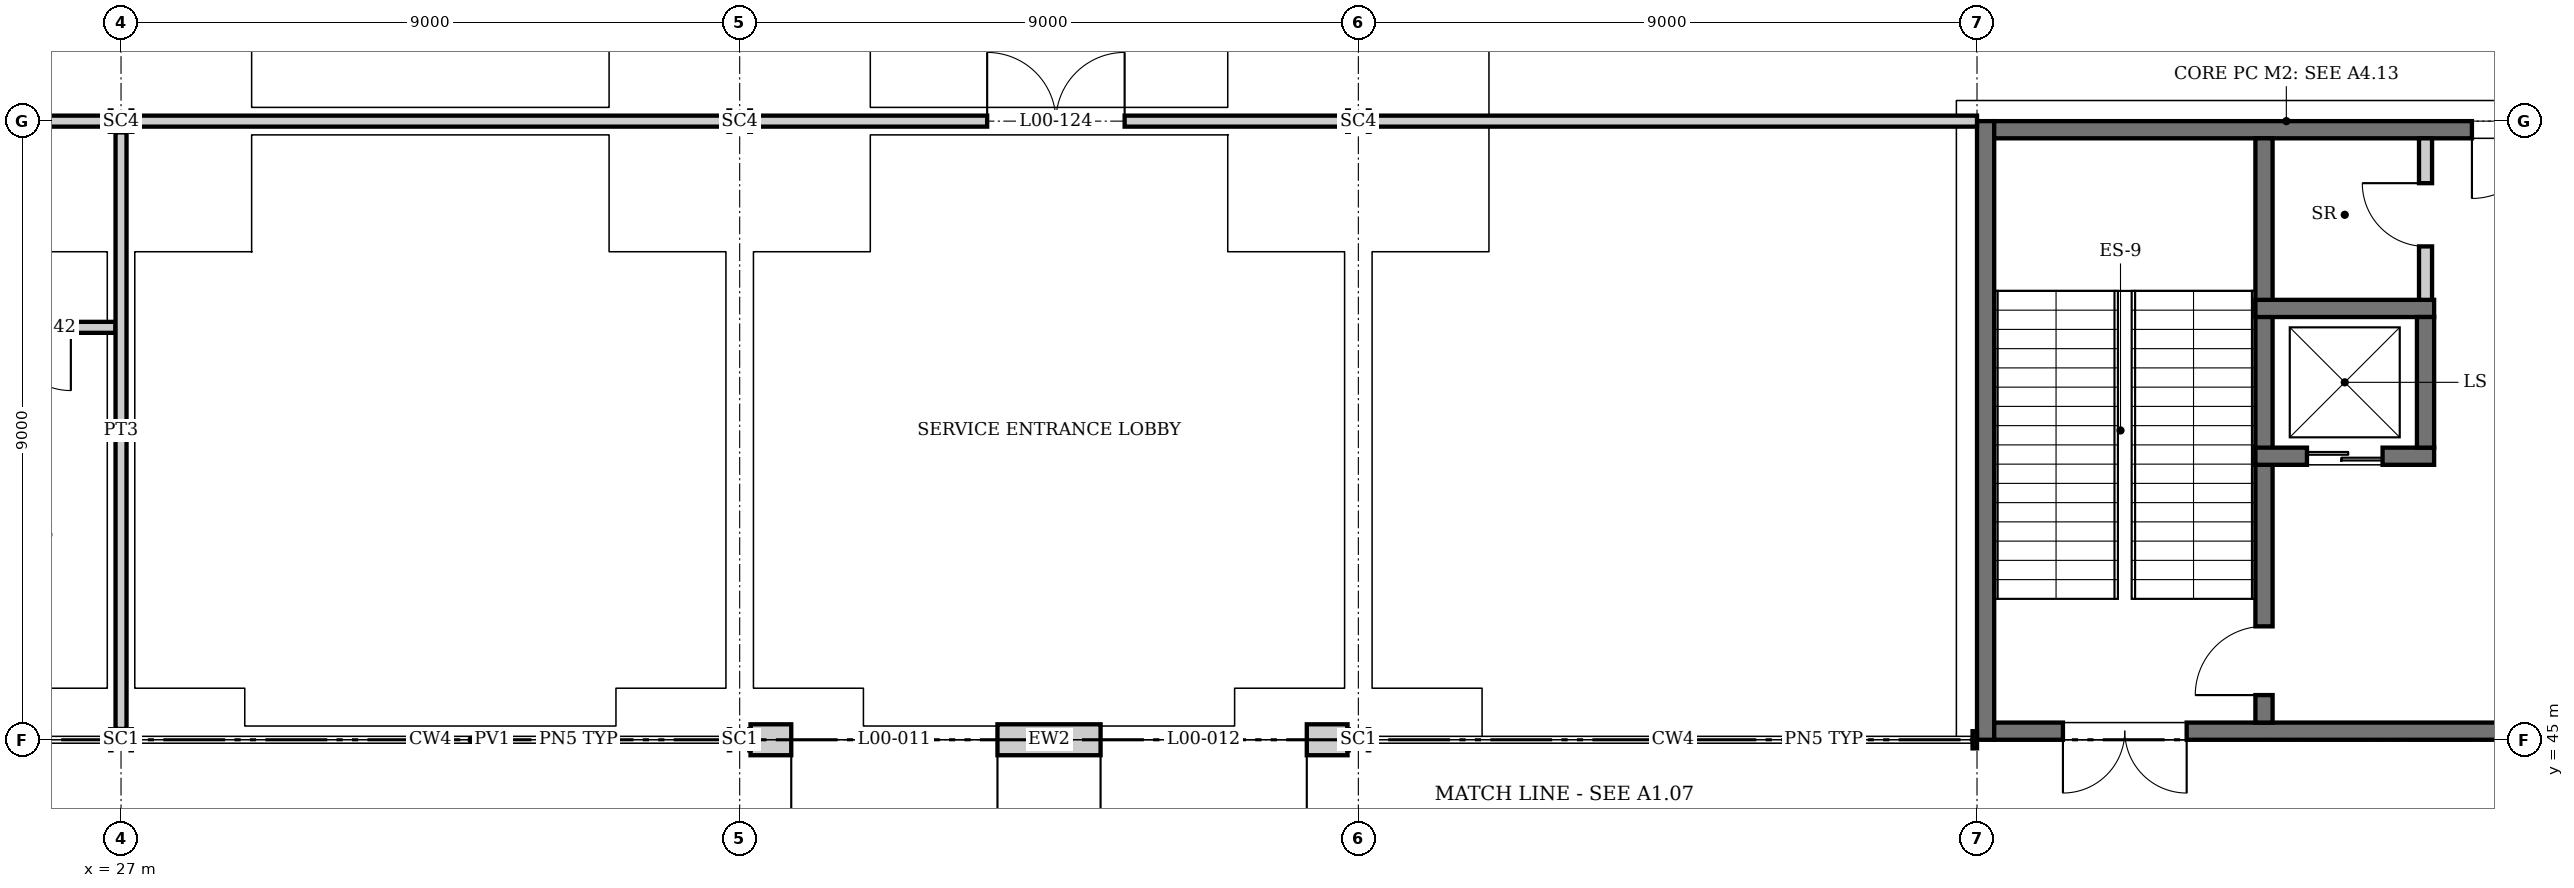
"""IFC4 building model, lengths in metres.
Left out: names, types, materials, properties, quantities, classifications, styles, units other than length and angle.
Written with IfcOpenShell. Run it as: python <this file> out.ifc"""

import sys

from ifc_helpers import new_model, si_unit, direction, frame, frame_2d, origin, origin_2d, place, context, subcontext, project, spatial, rectangle, i_section, extrude, element, fill, save


model = new_model("IFC4")
c1 = context("Model", 3, precision=1e-05, world=origin(), true_north=direction((0.0, 1.0)))
c2 = subcontext(c1, "Body", "Model", "MODEL_VIEW")
j1 = project(units=[si_unit("LENGTHUNIT", "METRE"), si_unit("PLANEANGLEUNIT", "RADIAN")], contexts=[c1])
p1 = place(None, origin())
s1 = spatial("IfcSite", under=j1, at=p1, CompositionType="ELEMENT")
p2 = place(p1, origin())
s2 = spatial("IfcBuilding", under=s1, at=p2, CompositionType="ELEMENT")
p3 = place(p2, origin())
s3 = spatial("IfcBuildingStorey", under=s2, at=p3, CompositionType="ELEMENT", Elevation=0.0)
p4 = place(p3, frame((27.0, 45.0, 0.0), z_axis=(0.0, 0.0, 1.0), x_axis=(0.0, 1.0, 0.0)))
e1 = element("IfcColumn", 1, at=p4, inside=s3, PredefinedType="COLUMN", context=c2, shape_type="SweptSolid", body=[
    extrude(i_section(OverallWidth=0.307, OverallDepth=0.315, WebThickness=0.012, FlangeThickness=0.019, at=origin_2d()), origin(), (0.0, 0.0, 1.0), 6.0),
])
p5 = place(p3, frame((27.0, 54.0, 0.0), z_axis=(0.0, 0.0, 1.0), x_axis=(0.0, 1.0, 0.0)))
e2 = element("IfcColumn", 2, at=p5, inside=s3, PredefinedType="COLUMN", context=c2, shape_type="SweptSolid", body=[
    extrude(i_section(OverallWidth=0.311, OverallDepth=0.327, WebThickness=0.016, FlangeThickness=0.025, at=origin_2d()), origin(), (0.0, 0.0, 1.0), 6.0),
])
p6 = place(p3, frame((36.0, 45.0, 0.0), z_axis=(0.0, 0.0, 1.0), x_axis=(0.0, 1.0, 0.0)))
e3 = element("IfcColumn", 3, at=p6, inside=s3, PredefinedType="COLUMN", context=c2, shape_type="SweptSolid", body=[
    extrude(i_section(OverallWidth=0.307, OverallDepth=0.315, WebThickness=0.012, FlangeThickness=0.019, at=origin_2d()), origin(), (0.0, 0.0, 1.0), 6.0),
])
p7 = place(p3, frame((36.0, 54.0, 0.0), z_axis=(0.0, 0.0, 1.0), x_axis=(0.0, 1.0, 0.0)))
e4 = element("IfcColumn", 4, at=p7, inside=s3, PredefinedType="COLUMN", context=c2, shape_type="SweptSolid", body=[
    extrude(i_section(OverallWidth=0.311, OverallDepth=0.327, WebThickness=0.016, FlangeThickness=0.025, at=origin_2d()), origin(), (0.0, 0.0, 1.0), 6.0),
])
p8 = place(p3, frame((45.0, 45.0, 0.0), z_axis=(0.0, 0.0, 1.0), x_axis=(0.0, 1.0, 0.0)))
e5 = element("IfcColumn", 5, at=p8, inside=s3, PredefinedType="COLUMN", context=c2, shape_type="SweptSolid", body=[
    extrude(i_section(OverallWidth=0.307, OverallDepth=0.315, WebThickness=0.012, FlangeThickness=0.019, at=origin_2d()), origin(), (0.0, 0.0, 1.0), 6.0),
])
p9 = place(p3, frame((45.0, 54.0, 0.0), z_axis=(0.0, 0.0, 1.0), x_axis=(0.0, 1.0, 0.0)))
e6 = element("IfcColumn", 6, at=p9, inside=s3, PredefinedType="COLUMN", context=c2, shape_type="SweptSolid", body=[
    extrude(i_section(OverallWidth=0.311, OverallDepth=0.327, WebThickness=0.016, FlangeThickness=0.025, at=origin_2d()), origin(), (0.0, 0.0, 1.0), 6.0),
])
p10 = place(p3, frame((54.125, 45.0, 0.0), z_axis=(0.0, 0.0, 1.0), x_axis=(0.0, 1.0, 0.0)))
e7 = element("IfcWall", 7, at=p10, inside=s3, PredefinedType="SHEAR", context=c2, shape_type="SweptSolid", body=[
    extrude(rectangle(XDim=9.0, YDim=0.25, at=frame_2d((4.5, 0.0))), origin(), (0.0, 0.0, 1.0), 6.0),
])
p11 = place(p3, frame((54.25, 45.125, 0.0), z_axis=(0.0, 0.0, 1.0), x_axis=(1.0, 0.0, 0.0)))
e8 = element("IfcWall", 8, at=p11, inside=s3, PredefinedType="SHEAR", context=c2, shape_type="SweptSolid", body=[
    extrude(rectangle(XDim=8.5, YDim=0.25, at=frame_2d((4.25, 0.0))), origin(), (0.0, 0.0, 1.0), 6.0),
])
p12 = place(p11, frame((1.0, 0.0, 0.0)))
e9 = element("IfcOpeningElement", 9, at=p12, cuts=e8, PredefinedType="OPENING", context=c2, shape_type="SweptSolid", body=[
    extrude(rectangle(XDim=1.8, YDim=2.4, at=frame_2d((0.9, 1.2))), frame((0.0, 0.135, 0.0), z_axis=(0.0, -1.0, 0.0), x_axis=(1.0, 0.0, 0.0)), (0.0, 0.0, 1.0), 0.27),
])
p13 = place(p3, frame((54.25, 53.875, 0.0), z_axis=(0.0, 0.0, 1.0), x_axis=(1.0, 0.0, 0.0)))
e10 = element("IfcWall", 10, at=p13, inside=s3, PredefinedType="SHEAR", context=c2, shape_type="SweptSolid", body=[
    extrude(rectangle(XDim=8.5, YDim=0.25, at=frame_2d((4.25, 0.0))), origin(), (0.0, 0.0, 1.0), 6.0),
])
p14 = place(p13, frame((6.95, 0.0, 0.0)))
e11 = element("IfcOpeningElement", 11, at=p14, cuts=e10, PredefinedType="OPENING", context=c2, shape_type="SweptSolid", body=[
    extrude(rectangle(XDim=1.0, YDim=2.1, at=frame_2d((0.5, 1.05))), frame((0.0, 0.135, 0.0), z_axis=(0.0, -1.0, 0.0), x_axis=(1.0, 0.0, 0.0)), (0.0, 0.0, 1.0), 0.27),
])
p15 = place(p3, frame((36.157, 45.0, 0.0), z_axis=(0.0, 0.0, 1.0), x_axis=(1.0, 0.0, 0.0)))
e12 = element("IfcWall", 12, at=p15, inside=s3, PredefinedType="SOLIDWALL", context=c2, shape_type="SweptSolid", body=[
    extrude(rectangle(XDim=8.685, YDim=0.45, at=frame_2d((4.343, 0.0))), origin(), (0.0, 0.0, 1.0), 5.444),
])
p16 = place(p15, frame((0.593, 0.0, 0.0)))
e13 = element("IfcOpeningElement", 13, at=p16, cuts=e12, PredefinedType="OPENING", context=c2, shape_type="SweptSolid", body=[
    extrude(rectangle(XDim=3.0, YDim=3.0, at=frame_2d((1.5, 1.5))), frame((0.0, 0.235, 0.0), z_axis=(0.0, -1.0, 0.0), x_axis=(1.0, 0.0, 0.0)), (0.0, 0.0, 1.0), 0.47),
])
p17 = place(p15, frame((5.093, 0.0, 0.0)))
e14 = element("IfcOpeningElement", 14, at=p17, cuts=e12, PredefinedType="OPENING", context=c2, shape_type="SweptSolid", body=[
    extrude(rectangle(XDim=3.0, YDim=3.0, at=frame_2d((1.5, 1.5))), frame((0.0, 0.235, 0.0), z_axis=(0.0, -1.0, 0.0), x_axis=(1.0, 0.0, 0.0)), (0.0, 0.0, 1.0), 0.47),
])
p18 = place(p3, frame((58.175, 45.25, 0.0), z_axis=(0.0, 0.0, 1.0), x_axis=(0.0, 1.0, 0.0)))
e15 = element("IfcWall", 15, at=p18, inside=s3, PredefinedType="SOLIDWALL", context=c2, shape_type="SweptSolid", body=[
    extrude(rectangle(XDim=8.5, YDim=0.25, at=frame_2d((4.25, 0.0))), origin(), (0.0, 0.0, 1.0), 5.75),
])
p19 = place(p18, frame((0.4, 0.0, 0.0)))
e16 = element("IfcOpeningElement", 16, at=p19, cuts=e15, PredefinedType="OPENING", context=c2, shape_type="SweptSolid", body=[
    extrude(rectangle(XDim=1.0, YDim=2.1, at=frame_2d((0.5, 1.05))), frame((0.0, 0.135, 0.0), z_axis=(0.0, -1.0, 0.0), x_axis=(1.0, 0.0, 0.0)), (0.0, 0.0, 1.0), 0.27),
])
p20 = place(p3, frame((58.05, 49.125, -1.4), z_axis=(0.0, 0.0, 1.0), x_axis=(1.0, 0.0, 0.0)))
e17 = element("IfcWall", 17, at=p20, inside=s3, PredefinedType="SOLIDWALL", context=c2, shape_type="SweptSolid", body=[
    extrude(rectangle(XDim=2.6, YDim=0.25, at=frame_2d((1.3, 0.0))), origin(), (0.0, 0.0, 1.0), 7.4),
])
p21 = place(p20, frame((0.75, 0.0, 1.4)))
e18 = element("IfcOpeningElement", 18, at=p21, cuts=e17, PredefinedType="OPENING", context=c2, shape_type="SweptSolid", body=[
    extrude(rectangle(XDim=1.1, YDim=2.1, at=frame_2d((0.55, 1.05))), frame((0.0, 0.135, 0.0), z_axis=(0.0, -1.0, 0.0), x_axis=(1.0, 0.0, 0.0)), (0.0, 0.0, 1.0), 0.27),
])
p22 = place(p3, frame((58.05, 51.275, -1.4), z_axis=(0.0, 0.0, 1.0), x_axis=(1.0, 0.0, 0.0)))
e19 = element("IfcWall", 19, at=p22, inside=s3, PredefinedType="SOLIDWALL", context=c2, shape_type="SweptSolid", body=[
    extrude(rectangle(XDim=2.6, YDim=0.25, at=frame_2d((1.3, 0.0))), origin(), (0.0, 0.0, 1.0), 7.4),
])
p23 = place(p3, frame((60.525, 49.25, -1.4), z_axis=(0.0, 0.0, 1.0), x_axis=(0.0, 1.0, 0.0)))
e20 = element("IfcWall", 20, at=p23, inside=s3, PredefinedType="SOLIDWALL", context=c2, shape_type="SweptSolid", body=[
    extrude(rectangle(XDim=1.9, YDim=0.25, at=frame_2d((0.95, 0.0))), origin(), (0.0, 0.0, 1.0), 7.4),
])
p24 = place(p3, frame((9.0, 51.0, 0.0), z_axis=(0.0, 0.0, 1.0), x_axis=(1.0, 0.0, 0.0)))
e21 = element("IfcWall", 21, at=p24, inside=s3, PredefinedType="PARTITIONING", context=c2, shape_type="SweptSolid", body=[
    extrude(rectangle(XDim=17.92, YDim=0.16, at=frame_2d((8.96, 0.0))), origin(), (0.0, 0.0, 1.0), 5.447),
])
p25 = place(p24, frame((2.6, 0.0, 0.0)))
e22 = element("IfcOpeningElement", 22, at=p25, cuts=e21, PredefinedType="OPENING", context=c2, shape_type="SweptSolid", body=[
    extrude(rectangle(XDim=1.0, YDim=2.1, at=frame_2d((0.5, 1.05))), frame((0.0, 0.09, 0.0), z_axis=(0.0, -1.0, 0.0), x_axis=(1.0, 0.0, 0.0)), (0.0, 0.0, 1.0), 0.18),
])
p26 = place(p24, frame((8.6, 0.0, 0.0)))
e23 = element("IfcOpeningElement", 23, at=p26, cuts=e21, PredefinedType="OPENING", context=c2, shape_type="SweptSolid", body=[
    extrude(rectangle(XDim=1.0, YDim=2.1, at=frame_2d((0.5, 1.05))), frame((0.0, 0.09, 0.0), z_axis=(0.0, -1.0, 0.0), x_axis=(1.0, 0.0, 0.0)), (0.0, 0.0, 1.0), 0.18),
])
p27 = place(p24, frame((13.1, 0.0, 0.0)))
e24 = element("IfcOpeningElement", 24, at=p27, cuts=e21, PredefinedType="OPENING", context=c2, shape_type="SweptSolid", body=[
    extrude(rectangle(XDim=1.2, YDim=2.1, at=frame_2d((0.6, 1.05))), frame((0.0, 0.09, 0.0), z_axis=(0.0, -1.0, 0.0), x_axis=(1.0, 0.0, 0.0)), (0.0, 0.0, 1.0), 0.18),
])
p28 = place(p24, frame((16.35, 0.0, 0.0)))
e25 = element("IfcOpeningElement", 25, at=p28, cuts=e21, PredefinedType="OPENING", context=c2, shape_type="SweptSolid", body=[
    extrude(rectangle(XDim=0.92, YDim=2.1, at=frame_2d((0.46, 1.05))), frame((0.0, 0.09, 0.0), z_axis=(0.0, -1.0, 0.0), x_axis=(1.0, 0.0, 0.0)), (0.0, 0.0, 1.0), 0.18),
])
for number, where, z_axis, x_axis in (
    (26, (18.164, 54.0, 0.0), (0.0, 0.0, 1.0), (1.0, 0.0, 0.0)),
    (27, (27.164, 54.0, 0.0), (0.0, 0.0, 1.0), (1.0, 0.0, 0.0)),
):
    element("IfcWall", number, at=place(p3, frame(where, z_axis=z_axis, x_axis=x_axis)), inside=s3, PredefinedType="PARTITIONING", context=c2, shape_type="SweptSolid", body=[
        extrude(rectangle(XDim=8.673, YDim=0.16, at=frame_2d((4.336, 0.0))), origin(), (0.0, 0.0, 1.0), 5.322),
    ])
p29 = place(p3, frame((36.164, 54.0, 0.0), z_axis=(0.0, 0.0, 1.0), x_axis=(1.0, 0.0, 0.0)))
e28 = element("IfcWall", 28, at=p29, inside=s3, PredefinedType="PARTITIONING", context=c2, shape_type="SweptSolid", body=[
    extrude(rectangle(XDim=8.673, YDim=0.16, at=frame_2d((4.336, 0.0))), origin(), (0.0, 0.0, 1.0), 5.322),
])
p30 = place(p29, frame((3.437, 0.0, 0.0)))
e29 = element("IfcOpeningElement", 29, at=p30, cuts=e28, PredefinedType="OPENING", context=c2, shape_type="SweptSolid", body=[
    extrude(rectangle(XDim=2.0, YDim=2.4, at=frame_2d((1.0, 1.2))), frame((0.0, 0.09, 0.0), z_axis=(0.0, -1.0, 0.0), x_axis=(1.0, 0.0, 0.0)), (0.0, 0.0, 1.0), 0.18),
])
p31 = place(p3, frame((45.164, 54.0, 0.0), z_axis=(0.0, 0.0, 1.0), x_axis=(1.0, 0.0, 0.0)))
e30 = element("IfcWall", 30, at=p31, inside=s3, PredefinedType="PARTITIONING", context=c2, shape_type="SweptSolid", body=[
    extrude(rectangle(XDim=8.836, YDim=0.16, at=frame_2d((4.418, 0.0))), origin(), (0.0, 0.0, 1.0), 5.322),
])
p32 = place(p3, frame((27.0, 45.157, 0.0), z_axis=(0.0, 0.0, 1.0), x_axis=(0.0, 1.0, 0.0)))
e31 = element("IfcWall", 31, at=p32, inside=s3, PredefinedType="PARTITIONING", context=c2, shape_type="SweptSolid", body=[
    extrude(rectangle(XDim=8.679, YDim=0.16, at=frame_2d((4.339, 0.0))), origin(), (0.0, 0.0, 1.0), 5.447),
])
p33 = place(p3, frame((60.525, 51.4, 0.0), z_axis=(0.0, 0.0, 1.0), x_axis=(0.0, 1.0, 0.0)))
e32 = element("IfcWall", 32, at=p33, inside=s3, PredefinedType="PARTITIONING", context=c2, shape_type="SweptSolid", body=[
    extrude(rectangle(XDim=2.35, YDim=0.19, at=frame_2d((1.175, 0.0))), origin(), (0.0, 0.0, 1.0), 5.75),
])
p34 = place(p33, frame((0.778, 0.0, 0.0)))
e33 = element("IfcOpeningElement", 33, at=p34, cuts=e32, PredefinedType="OPENING", context=c2, shape_type="SweptSolid", body=[
    extrude(rectangle(XDim=0.92, YDim=2.1, at=frame_2d((0.46, 1.05))), frame((0.0, 0.105, 0.0), z_axis=(0.0, -1.0, 0.0), x_axis=(1.0, 0.0, 0.0)), (0.0, 0.0, 1.0), 0.21),
])
p35 = place(p16, frame((3.0, 0.0, 0.0), z_axis=(0.0, 0.0, 1.0), x_axis=(-1.0, 0.0, 0.0)))
e34 = element("IfcDoor", 34, at=p35, inside=s3, OperationType="DOUBLE_DOOR_SINGLE_SWING", PredefinedType="DOOR", context=c2, shape_type="SweptSolid", body=[
    extrude(rectangle(XDim=3.0, YDim=3.0, at=frame_2d((1.5, 1.5))), frame((0.0, 0.025, 0.0), z_axis=(0.0, -1.0, 0.0), x_axis=(1.0, 0.0, 0.0)), (0.0, 0.0, 1.0), 0.05),
])
fill(e13, e34)
p36 = place(p17, frame((3.0, 0.0, 0.0), z_axis=(0.0, 0.0, 1.0), x_axis=(-1.0, 0.0, 0.0)))
e35 = element("IfcDoor", 35, at=p36, inside=s3, OperationType="DOUBLE_DOOR_SINGLE_SWING", PredefinedType="DOOR", context=c2, shape_type="SweptSolid", body=[
    extrude(rectangle(XDim=3.0, YDim=3.0, at=frame_2d((1.5, 1.5))), frame((0.0, 0.025, 0.0), z_axis=(0.0, -1.0, 0.0), x_axis=(1.0, 0.0, 0.0)), (0.0, 0.0, 1.0), 0.05),
])
fill(e14, e35)
p37 = place(p12, frame((1.8, 0.0, 0.0), z_axis=(0.0, 0.0, 1.0), x_axis=(-1.0, 0.0, 0.0)))
e36 = element("IfcDoor", 36, at=p37, inside=s3, OperationType="DOUBLE_DOOR_SINGLE_SWING", PredefinedType="DOOR", context=c2, shape_type="SweptSolid", body=[
    extrude(rectangle(XDim=1.8, YDim=2.4, at=frame_2d((0.9, 1.2))), frame((0.0, 0.025, 0.0), z_axis=(0.0, -1.0, 0.0), x_axis=(1.0, 0.0, 0.0)), (0.0, 0.0, 1.0), 0.05),
])
fill(e9, e36)
p38 = place(p21, origin())
e37 = element("IfcDoor", 37, at=p38, inside=s3, OperationType="DOUBLE_DOOR_SLIDING", PredefinedType="DOOR", context=c2, shape_type="SweptSolid", body=[
    extrude(rectangle(XDim=1.1, YDim=2.1, at=frame_2d((0.55, 1.05))), frame((0.0, 0.025, 0.0), z_axis=(0.0, -1.0, 0.0), x_axis=(1.0, 0.0, 0.0)), (0.0, 0.0, 1.0), 0.05),
])
fill(e18, e37)
p39 = place(p19, origin())
e38 = element("IfcDoor", 38, at=p39, inside=s3, OperationType="SINGLE_SWING_LEFT", PredefinedType="DOOR", context=c2, shape_type="SweptSolid", body=[
    extrude(rectangle(XDim=1.0, YDim=2.1, at=frame_2d((0.5, 1.05))), frame((0.0, 0.025, 0.0), z_axis=(0.0, -1.0, 0.0), x_axis=(1.0, 0.0, 0.0)), (0.0, 0.0, 1.0), 0.05),
])
fill(e16, e38)
p40 = place(p14, frame((1.0, 0.0, 0.0), z_axis=(0.0, 0.0, 1.0), x_axis=(-1.0, 0.0, 0.0)))
e39 = element("IfcDoor", 39, at=p40, inside=s3, OperationType="SINGLE_SWING_RIGHT", PredefinedType="DOOR", context=c2, shape_type="SweptSolid", body=[
    extrude(rectangle(XDim=1.0, YDim=2.1, at=frame_2d((0.5, 1.05))), frame((0.0, 0.025, 0.0), z_axis=(0.0, -1.0, 0.0), x_axis=(1.0, 0.0, 0.0)), (0.0, 0.0, 1.0), 0.05),
])
fill(e11, e39)
p41 = place(p34, origin())
e40 = element("IfcDoor", 40, at=p41, inside=s3, OperationType="SINGLE_SWING_RIGHT", PredefinedType="DOOR", context=c2, shape_type="SweptSolid", body=[
    extrude(rectangle(XDim=0.92, YDim=2.1, at=frame_2d((0.46, 1.05))), frame((0.0, 0.025, 0.0), z_axis=(0.0, -1.0, 0.0), x_axis=(1.0, 0.0, 0.0)), (0.0, 0.0, 1.0), 0.05),
])
fill(e33, e40)
p42 = place(p30, origin())
e41 = element("IfcDoor", 41, at=p42, inside=s3, OperationType="DOUBLE_DOOR_SINGLE_SWING", PredefinedType="DOOR", context=c2, shape_type="SweptSolid", body=[
    extrude(rectangle(XDim=2.0, YDim=2.4, at=frame_2d((1.0, 1.2))), frame((0.0, 0.025, 0.0), z_axis=(0.0, -1.0, 0.0), x_axis=(1.0, 0.0, 0.0)), (0.0, 0.0, 1.0), 0.05),
])
fill(e29, e41)
p43 = place(p28, frame((0.92, 0.0, 0.0), z_axis=(0.0, 0.0, 1.0), x_axis=(-1.0, 0.0, 0.0)))
e42 = element("IfcDoor", 42, at=p43, inside=s3, OperationType="SINGLE_SWING_LEFT", PredefinedType="DOOR", context=c2, shape_type="SweptSolid", body=[
    extrude(rectangle(XDim=0.92, YDim=2.1, at=frame_2d((0.46, 1.05))), frame((0.0, 0.025, 0.0), z_axis=(0.0, -1.0, 0.0), x_axis=(1.0, 0.0, 0.0)), (0.0, 0.0, 1.0), 0.05),
])
fill(e25, e42)
save(model, sys.argv[1])
